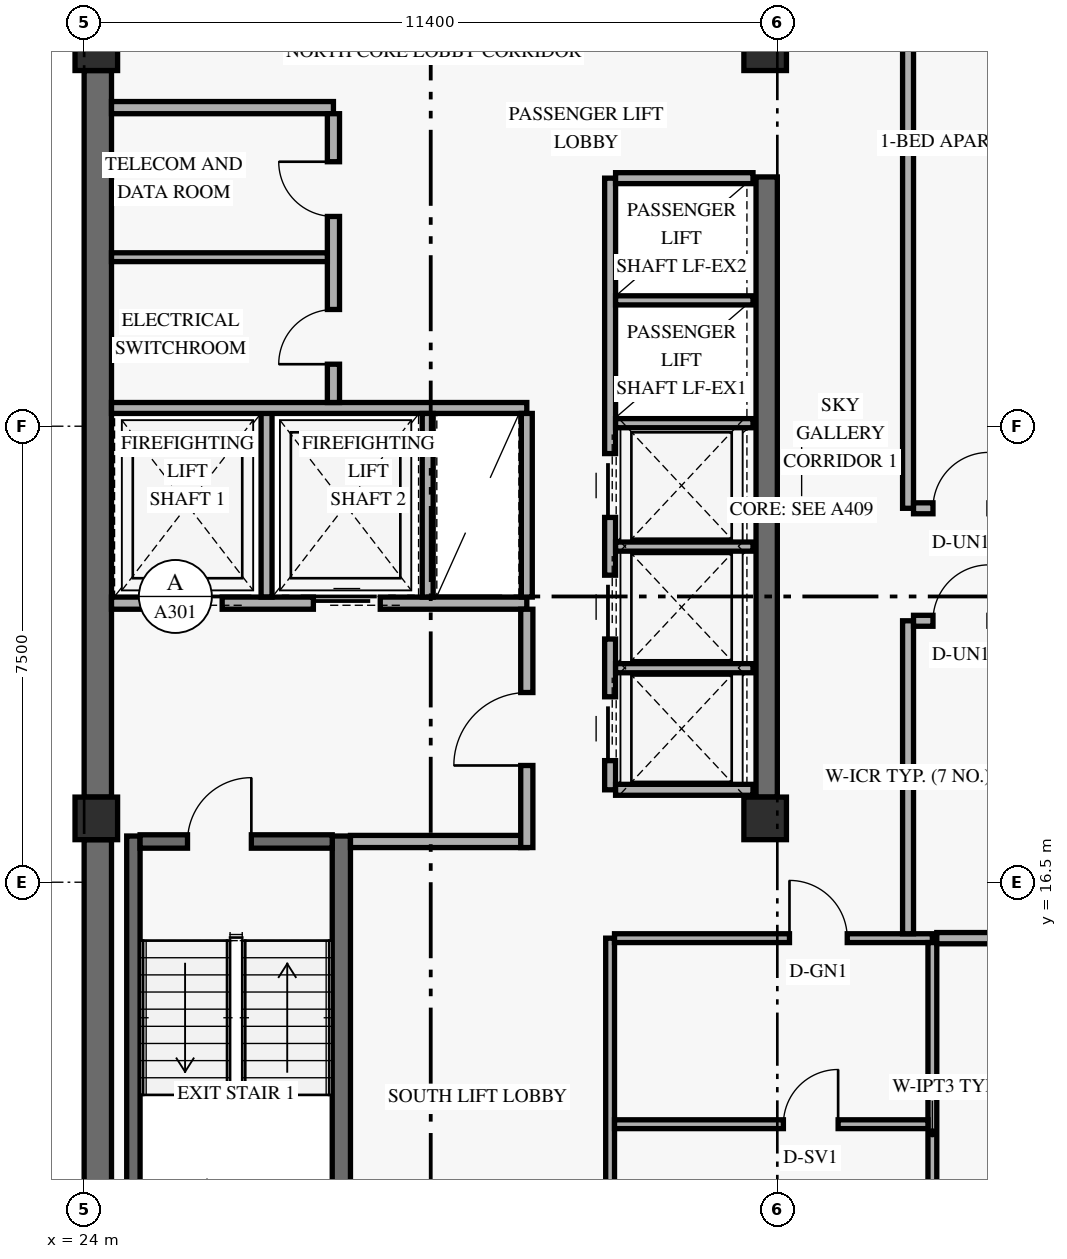
"""IFC4 building model, lengths in metres.
Left out: names, types, materials, properties, quantities, classifications, styles, units other than length and angle.
Written with IfcOpenShell. Run it as: python <this file> out.ifc"""

import sys

from ifc_helpers import new_model, si_unit, direction, frame, frame_2d, origin, origin_2d, place, context, subcontext, project, spatial, rectangle, extrude, element, fill, save


model = new_model("IFC4")
c1 = context("Model", 3, precision=1e-05, world=origin(), true_north=direction((0.0, 1.0)))
c2 = subcontext(c1, "Body", "Model", "MODEL_VIEW")
j1 = project(units=[si_unit("LENGTHUNIT", "METRE"), si_unit("PLANEANGLEUNIT", "RADIAN")], contexts=[c1])
p1 = place(None, origin())
s1 = spatial("IfcSite", under=j1, at=p1, CompositionType="ELEMENT")
p2 = place(p1, origin())
s2 = spatial("IfcBuilding", under=s1, at=p2, CompositionType="ELEMENT")
p3 = place(p2, frame((0.0, 0.0, 253.2)))
s3 = spatial("IfcBuildingStorey", under=s2, at=p3, CompositionType="ELEMENT", Elevation=253.2)
p4 = place(p3, frame((24.225, 9.6, 0.0), z_axis=(0.0, 0.0, 1.0), x_axis=(0.0, 1.0, 0.0)))
e1 = element("IfcWall", 1, at=p4, inside=s3, PredefinedType="SHEAR", context=c2, shape_type="SweptSolid", body=[
    extrude(rectangle(XDim=7.6, YDim=0.45, at=frame_2d((3.8, 0.0))), origin(), (0.0, 0.0, 1.0), 2.821),
])
p5 = place(p3, frame((24.225, 17.9, 0.0), z_axis=(0.0, 0.0, 1.0), x_axis=(0.0, 1.0, 0.0)))
e2 = element("IfcWall", 2, at=p5, inside=s3, PredefinedType="SHEAR", context=c2, shape_type="SweptSolid", body=[
    extrude(rectangle(XDim=11.95, YDim=0.45, at=frame_2d((5.975, 0.0))), origin(), (0.0, 0.0, 1.0), 2.821),
])
p6 = place(p3, frame((35.225, 17.9, 0.0), z_axis=(0.0, 0.0, 1.0), x_axis=(0.0, 1.0, 0.0)))
e3 = element("IfcWall", 3, at=p6, inside=s3, PredefinedType="SHEAR", context=c2, shape_type="SweptSolid", body=[
    extrude(rectangle(XDim=10.2, YDim=0.35, at=frame_2d((5.1, 0.0))), origin(), (0.0, 0.0, 1.0), 2.821),
])
p7 = place(p3, frame((24.81, 9.5, 0.0), z_axis=(0.0, 0.0, 1.0), x_axis=(0.0, 1.0, 0.0)))
e4 = element("IfcWall", 4, at=p7, inside=s3, PredefinedType="SHEAR", context=c2, shape_type="SweptSolid", body=[
    extrude(rectangle(XDim=7.76, YDim=0.22, at=frame_2d((3.88, 0.0))), origin(), (0.0, 0.0, 1.0), 3.36),
])
p8 = place(p3, frame((28.23, 9.5, 0.0), z_axis=(0.0, 0.0, 1.0), x_axis=(0.0, 1.0, 0.0)))
e5 = element("IfcWall", 5, at=p8, inside=s3, PredefinedType="SHEAR", context=c2, shape_type="SweptSolid", body=[
    extrude(rectangle(XDim=7.76, YDim=0.3, at=frame_2d((3.88, 0.0))), origin(), (0.0, 0.0, 1.0), 3.36),
])
p9 = place(p3, frame((24.92, 17.17, 0.0), z_axis=(0.0, 0.0, 1.0), x_axis=(1.0, 0.0, 0.0)))
e6 = element("IfcWall", 6, at=p9, inside=s3, PredefinedType="SHEAR", context=c2, shape_type="SweptSolid", body=[
    extrude(rectangle(XDim=3.16, YDim=0.22, at=frame_2d((1.58, 0.0))), origin(), (0.0, 0.0, 1.0), 3.36),
])
p10 = place(p9, frame((0.78, 0.0, 0.0)))
e7 = element("IfcOpeningElement", 7, at=p10, cuts=e6, PredefinedType="OPENING", context=c2, shape_type="SweptSolid", body=[
    extrude(rectangle(XDim=1.05, YDim=2.15, at=frame_2d((0.525, 1.075))), frame((0.0, 0.12, 0.0), z_axis=(0.0, -1.0, 0.0), x_axis=(1.0, 0.0, 0.0)), (0.0, 0.0, 1.0), 0.24),
])
for number, where, z_axis, x_axis in (
    (8, (24.2, 17.55, 0.0), (0.0, 0.0, 1.0), (1.0, 0.0, 0.0)),
    (9, (24.2, 30.2, 0.0), (0.0, 0.0, 1.0), (1.0, 0.0, 0.0)),
    (10, (35.2, 17.55, 0.0), (0.0, 0.0, 1.0), (1.0, 0.0, 0.0)),
    (11, (35.2, 30.2, 0.0), (0.0, 0.0, 1.0), (1.0, 0.0, 0.0)),
):
    element("IfcColumn", number, at=place(p3, frame(where, z_axis=z_axis, x_axis=x_axis)), inside=s3, PredefinedType="COLUMN", context=c2, shape_type="SweptSolid", body=[
        extrude(rectangle(XDim=0.7, YDim=0.7, at=origin_2d()), origin(), (0.0, 0.0, 1.0), 3.6),
    ])
p11 = place(p3, frame((24.45, 21.09, 0.0), z_axis=(0.0, 0.0, 1.0), x_axis=(1.0, 0.0, 0.0)))
e12 = element("IfcWall", 12, at=p11, inside=s3, PredefinedType="STANDARD", context=c2, shape_type="SweptSolid", body=[
    extrude(rectangle(XDim=6.83, YDim=0.2, at=frame_2d((3.415, 0.0))), origin(), (0.0, 0.0, 1.0), 3.36),
])
p12 = place(p11, frame((0.72, 0.0, 0.0)))
e13 = element("IfcOpeningElement", 13, at=p12, cuts=e12, PredefinedType="OPENING", context=c2, shape_type="SweptSolid", body=[
    extrude(rectangle(XDim=1.1, YDim=2.2, at=frame_2d((0.55, 1.1))), frame((0.0, 0.11, 0.0), z_axis=(0.0, -1.0, 0.0), x_axis=(1.0, 0.0, 0.0)), (0.0, 0.0, 1.0), 0.22),
])
p13 = place(p11, frame((3.32, 0.0, 0.0)))
e14 = element("IfcOpeningElement", 14, at=p13, cuts=e12, PredefinedType="OPENING", context=c2, shape_type="SweptSolid", body=[
    extrude(rectangle(XDim=1.1, YDim=2.2, at=frame_2d((0.55, 1.1))), frame((0.0, 0.11, 0.0), z_axis=(0.0, -1.0, 0.0), x_axis=(1.0, 0.0, 0.0)), (0.0, 0.0, 1.0), 0.22),
])
p14 = place(p3, frame((28.38, 17.17, 0.0), z_axis=(0.0, 0.0, 1.0), x_axis=(1.0, 0.0, 0.0)))
e15 = element("IfcWall", 15, at=p14, inside=s3, PredefinedType="STANDARD", context=c2, shape_type="SweptSolid", body=[
    extrude(rectangle(XDim=2.9, YDim=0.2, at=frame_2d((1.45, 0.0))), origin(), (0.0, 0.0, 1.0), 3.36),
])
p15 = place(p3, frame((31.28, 17.07, 0.0), z_axis=(0.0, 0.0, 1.0), x_axis=(0.0, 1.0, 0.0)))
e16 = element("IfcWall", 16, at=p15, inside=s3, PredefinedType="STANDARD", context=c2, shape_type="SweptSolid", body=[
    extrude(rectangle(XDim=3.92, YDim=0.2, at=frame_2d((1.96, 0.0))), origin(), (0.0, 0.0, 1.0), 2.803),
])
p16 = place(p15, frame((1.35, 0.0, 0.0)))
e17 = element("IfcOpeningElement", 17, at=p16, cuts=e16, PredefinedType="OPENING", context=c2, shape_type="SweptSolid", body=[
    extrude(rectangle(XDim=1.2, YDim=2.15, at=frame_2d((0.6, 1.075))), frame((0.0, 0.11, 0.0), z_axis=(0.0, -1.0, 0.0), x_axis=(1.0, 0.0, 0.0)), (0.0, 0.0, 1.0), 0.22),
])
p17 = place(p3, frame((27.0, 21.19, 0.0), z_axis=(0.0, 0.0, 1.0), x_axis=(0.0, 1.0, 0.0)))
e18 = element("IfcWall", 18, at=p17, inside=s3, PredefinedType="STANDARD", context=c2, shape_type="SweptSolid", body=[
    extrude(rectangle(XDim=3.11, YDim=0.18, at=frame_2d((1.555, 0.0))), origin(), (0.0, 0.0, 1.0), 3.36),
])
p18 = place(p3, frame((24.45, 24.3, 0.0), z_axis=(0.0, 0.0, 1.0), x_axis=(1.0, 0.0, 0.0)))
e19 = element("IfcWall", 19, at=p18, inside=s3, PredefinedType="STANDARD", context=c2, shape_type="SweptSolid", body=[
    extrude(rectangle(XDim=6.83, YDim=0.18, at=frame_2d((3.415, 0.0))), origin(), (0.0, 0.0, 1.0), 3.36),
])
for number, where, z_axis, x_axis in (
    (20, (29.65, 21.19, 0.0), (0.0, 0.0, 1.0), (0.0, 1.0, 0.0)),
    (21, (31.28, 21.19, 0.0), (0.0, 0.0, 1.0), (0.0, 1.0, 0.0)),
):
    element("IfcWall", number, at=place(p3, frame(where, z_axis=z_axis, x_axis=x_axis)), inside=s3, PredefinedType="STANDARD", context=c2, shape_type="SweptSolid", body=[
        extrude(rectangle(XDim=3.02, YDim=0.18, at=frame_2d((1.51, 0.0))), origin(), (0.0, 0.0, 1.0), 3.36),
    ])
p19 = place(p3, frame((24.45, 29.24, 0.0), z_axis=(0.0, 0.0, 1.0), x_axis=(1.0, 0.0, 0.0)))
e22 = element("IfcWall", 22, at=p19, inside=s3, PredefinedType="STANDARD", context=c2, shape_type="SweptSolid", body=[
    extrude(rectangle(XDim=3.65, YDim=0.2, at=frame_2d((1.825, 0.0))), origin(), (0.0, 0.0, 1.0), 3.36),
])
p20 = place(p3, frame((28.1, 24.39, 0.0), z_axis=(0.0, 0.0, 1.0), x_axis=(0.0, 1.0, 0.0)))
e23 = element("IfcWall", 23, at=p20, inside=s3, PredefinedType="STANDARD", context=c2, shape_type="SweptSolid", body=[
    extrude(rectangle(XDim=4.75, YDim=0.2, at=frame_2d((2.375, 0.0))), origin(), (0.0, 0.0, 1.0), 3.36),
])
p21 = place(p20, frame((0.63, 0.0, 0.0)))
e24 = element("IfcOpeningElement", 24, at=p21, cuts=e23, PredefinedType="OPENING", context=c2, shape_type="SweptSolid", body=[
    extrude(rectangle(XDim=0.9, YDim=2.1, at=frame_2d((0.45, 1.05))), frame((0.0, 0.11, 0.0), z_axis=(0.0, -1.0, 0.0), x_axis=(1.0, 0.0, 0.0)), (0.0, 0.0, 1.0), 0.22),
])
p22 = place(p20, frame((3.06, 0.0, 0.0)))
e25 = element("IfcOpeningElement", 25, at=p22, cuts=e23, PredefinedType="OPENING", context=c2, shape_type="SweptSolid", body=[
    extrude(rectangle(XDim=0.9, YDim=2.1, at=frame_2d((0.45, 1.05))), frame((0.0, 0.11, 0.0), z_axis=(0.0, -1.0, 0.0), x_axis=(1.0, 0.0, 0.0)), (0.0, 0.0, 1.0), 0.22),
])
p23 = place(p3, frame((24.45, 26.78, 0.0), z_axis=(0.0, 0.0, 1.0), x_axis=(1.0, 0.0, 0.0)))
e26 = element("IfcWall", 26, at=p23, inside=s3, PredefinedType="PARTITIONING", context=c2, shape_type="SweptSolid", body=[
    extrude(rectangle(XDim=3.55, YDim=0.145, at=frame_2d((1.775, 0.0))), origin(), (0.0, 0.0, 1.0), 3.36),
])
p24 = place(p3, frame((32.65, 18.02, 0.0), z_axis=(0.0, 0.0, 1.0), x_axis=(0.0, 1.0, 0.0)))
e27 = element("IfcWall", 27, at=p24, inside=s3, PredefinedType="STANDARD", context=c2, shape_type="SweptSolid", body=[
    extrude(rectangle(XDim=10.06, YDim=0.18, at=frame_2d((5.03, 0.0))), origin(), (0.0, 0.0, 1.0), 3.36),
])
p25 = place(p24, frame((0.48, 0.0, 0.0)))
e28 = element("IfcOpeningElement", 28, at=p25, cuts=e27, PredefinedType="OPENING", context=c2, shape_type="SweptSolid", body=[
    extrude(rectangle(XDim=1.05, YDim=2.2, at=frame_2d((0.525, 1.1))), frame((0.0, 0.1, 0.0), z_axis=(0.0, -1.0, 0.0), x_axis=(1.0, 0.0, 0.0)), (0.0, 0.0, 1.0), 0.2),
])
p26 = place(p24, frame((2.48, 0.0, 0.0)))
e29 = element("IfcOpeningElement", 29, at=p26, cuts=e27, PredefinedType="OPENING", context=c2, shape_type="SweptSolid", body=[
    extrude(rectangle(XDim=1.05, YDim=2.2, at=frame_2d((0.525, 1.1))), frame((0.0, 0.1, 0.0), z_axis=(0.0, -1.0, 0.0), x_axis=(1.0, 0.0, 0.0)), (0.0, 0.0, 1.0), 0.2),
])
p27 = place(p24, frame((4.48, 0.0, 0.0)))
e30 = element("IfcOpeningElement", 30, at=p27, cuts=e27, PredefinedType="OPENING", context=c2, shape_type="SweptSolid", body=[
    extrude(rectangle(XDim=1.05, YDim=2.2, at=frame_2d((0.525, 1.1))), frame((0.0, 0.1, 0.0), z_axis=(0.0, -1.0, 0.0), x_axis=(1.0, 0.0, 0.0)), (0.0, 0.0, 1.0), 0.2),
])
for number, where, z_axis, x_axis in (
    (31, (32.74, 18.02, 0.0), (0.0, 0.0, 1.0), (1.0, 0.0, 0.0)),
    (32, (32.74, 28.08, 0.0), (0.0, 0.0, 1.0), (1.0, 0.0, 0.0)),
):
    element("IfcWall", number, at=place(p3, frame(where, z_axis=z_axis, x_axis=x_axis)), inside=s3, PredefinedType="STANDARD", context=c2, shape_type="SweptSolid", body=[
        extrude(rectangle(XDim=2.26, YDim=0.18, at=frame_2d((1.13, 0.0))), origin(), (0.0, 0.0, 1.0), 3.36),
    ])
for number, where, z_axis, x_axis in (
    (33, (32.74, 20.02, 0.0), (0.0, 0.0, 1.0), (1.0, 0.0, 0.0)),
    (34, (32.74, 22.02, 0.0), (0.0, 0.0, 1.0), (1.0, 0.0, 0.0)),
    (35, (32.74, 24.05, 0.0), (0.0, 0.0, 1.0), (1.0, 0.0, 0.0)),
    (36, (32.74, 26.07, 0.0), (0.0, 0.0, 1.0), (1.0, 0.0, 0.0)),
):
    element("IfcWall", number, at=place(p3, frame(where, z_axis=z_axis, x_axis=x_axis)), inside=s3, PredefinedType="STANDARD", context=c2, shape_type="SweptSolid", body=[
        extrude(rectangle(XDim=2.26, YDim=0.15, at=frame_2d((1.13, 0.0))), origin(), (0.0, 0.0, 1.0), 3.36),
    ])
p28 = place(p3, frame((32.65, 9.5, 0.0), z_axis=(0.0, 0.0, 1.0), x_axis=(0.0, 1.0, 0.0)))
e37 = element("IfcWall", 37, at=p28, inside=s3, PredefinedType="PARTITIONING", context=c2, shape_type="SweptSolid", body=[
    extrude(rectangle(XDim=6.08, YDim=0.145, at=frame_2d((3.04, 0.0))), origin(), (0.0, 0.0, 1.0), 3.36),
])
p29 = place(p3, frame((32.722, 15.58, 0.0), z_axis=(0.0, 0.0, 1.0), x_axis=(1.0, 0.0, 0.0)))
e38 = element("IfcWall", 38, at=p29, inside=s3, PredefinedType="PARTITIONING", context=c2, shape_type="SweptSolid", body=[
    extrude(rectangle(XDim=5.228, YDim=0.145, at=frame_2d((2.614, 0.0))), origin(), (0.0, 0.0, 1.0), 2.803),
])
p30 = place(p29, frame((2.877, 0.0, 0.0)))
e39 = element("IfcOpeningElement", 39, at=p30, cuts=e38, PredefinedType="OPENING", context=c2, shape_type="SweptSolid", body=[
    extrude(rectangle(XDim=0.95, YDim=2.15, at=frame_2d((0.475, 1.075))), frame((0.0, 0.083, 0.0), z_axis=(0.0, -1.0, 0.0), x_axis=(1.0, 0.0, 0.0)), (0.0, 0.0, 1.0), 0.165),
])
p31 = place(p3, frame((37.95, 9.25, 0.0), z_axis=(0.0, 0.0, 1.0), x_axis=(0.0, 1.0, 0.0)))
e40 = element("IfcWall", 40, at=p31, inside=s3, PredefinedType="PARTITIONING", context=c2, shape_type="SweptSolid", body=[
    extrude(rectangle(XDim=6.258, YDim=0.145, at=frame_2d((3.129, 0.0))), origin(), (0.0, 0.0, 1.0), 2.803),
])
p32 = place(p3, frame((32.722, 12.52, 0.0), z_axis=(0.0, 0.0, 1.0), x_axis=(1.0, 0.0, 0.0)))
e41 = element("IfcWall", 41, at=p32, inside=s3, PredefinedType="PARTITIONING", context=c2, shape_type="SweptSolid", body=[
    extrude(rectangle(XDim=5.155, YDim=0.145, at=frame_2d((2.578, 0.0))), origin(), (0.0, 0.0, 1.0), 2.803),
])
p33 = place(p32, frame((2.778, 0.0, 0.0)))
e42 = element("IfcOpeningElement", 42, at=p33, cuts=e41, PredefinedType="OPENING", context=c2, shape_type="SweptSolid", body=[
    extrude(rectangle(XDim=0.9, YDim=2.1, at=frame_2d((0.45, 1.05))), frame((0.0, 0.083, 0.0), z_axis=(0.0, -1.0, 0.0), x_axis=(1.0, 0.0, 0.0)), (0.0, 0.0, 1.0), 0.165),
])
p34 = place(p3, frame((37.55, 15.653, 0.0), z_axis=(0.0, 0.0, 1.0), x_axis=(0.0, 1.0, 0.0)))
e43 = element("IfcWall", 43, at=p34, inside=s3, PredefinedType="STANDARD", context=c2, shape_type="SweptSolid", body=[
    extrude(rectangle(XDim=5.147, YDim=0.18, at=frame_2d((2.574, 0.0))), origin(), (0.0, 0.0, 1.0), 2.803),
])
p35 = place(p3, frame((37.55, 22.65, 0.0), z_axis=(0.0, 0.0, 1.0), x_axis=(0.0, 1.0, 0.0)))
e44 = element("IfcWall", 44, at=p35, inside=s3, PredefinedType="STANDARD", context=c2, shape_type="SweptSolid", body=[
    extrude(rectangle(XDim=8.628, YDim=0.18, at=frame_2d((4.314, 0.0))), origin(), (0.0, 0.0, 1.0), 2.803),
])
p36 = place(p3, frame((37.64, 20.8, 0.0), z_axis=(0.0, 0.0, 1.0), x_axis=(1.0, 0.0, 0.0)))
e45 = element("IfcWall", 45, at=p36, inside=s3, PredefinedType="STANDARD", context=c2, shape_type="SweptSolid", body=[
    extrude(rectangle(XDim=12.17, YDim=0.18, at=frame_2d((6.085, 0.0))), origin(), (0.0, 0.0, 1.0), 2.803),
])
p37 = place(p36, frame((0.32, 0.0, 0.0)))
e46 = element("IfcOpeningElement", 46, at=p37, cuts=e45, PredefinedType="OPENING", context=c2, shape_type="SweptSolid", body=[
    extrude(rectangle(XDim=0.92, YDim=2.15, at=frame_2d((0.46, 1.075))), frame((0.0, 0.1, 0.0), z_axis=(0.0, -1.0, 0.0), x_axis=(1.0, 0.0, 0.0)), (0.0, 0.0, 1.0), 0.2),
])
p38 = place(p3, frame((37.64, 22.65, 0.0), z_axis=(0.0, 0.0, 1.0), x_axis=(1.0, 0.0, 0.0)))
e47 = element("IfcWall", 47, at=p38, inside=s3, PredefinedType="STANDARD", context=c2, shape_type="SweptSolid", body=[
    extrude(rectangle(XDim=12.17, YDim=0.18, at=frame_2d((6.085, 0.0))), origin(), (0.0, 0.0, 1.0), 2.803),
])
p39 = place(p38, frame((0.32, 0.0, 0.0)))
e48 = element("IfcOpeningElement", 48, at=p39, cuts=e47, PredefinedType="OPENING", context=c2, shape_type="SweptSolid", body=[
    extrude(rectangle(XDim=0.92, YDim=2.15, at=frame_2d((0.46, 1.075))), frame((0.0, 0.1, 0.0), z_axis=(0.0, -1.0, 0.0), x_axis=(1.0, 0.0, 0.0)), (0.0, 0.0, 1.0), 0.2),
])
p40 = place(p3, frame((38.022, 15.58, 0.0), z_axis=(0.0, 0.0, 1.0), x_axis=(1.0, 0.0, 0.0)))
e49 = element("IfcWall", 49, at=p40, inside=s3, PredefinedType="PARTITIONING", context=c2, shape_type="SweptSolid", body=[
    extrude(rectangle(XDim=11.788, YDim=0.185, at=frame_2d((5.894, 0.0))), origin(), (0.0, 0.0, 1.0), 2.803),
])
p41 = place(p10, frame((1.05, 0.0, 0.0), z_axis=(0.0, 0.0, 1.0), x_axis=(-1.0, 0.0, 0.0)))
e50 = element("IfcDoor", 50, at=p41, inside=s3, OperationType="SINGLE_SWING_LEFT", PredefinedType="DOOR", context=c2, shape_type="SweptSolid", body=[
    extrude(rectangle(XDim=1.05, YDim=2.15, at=frame_2d((0.525, 1.075))), frame((0.0, 0.025, 0.0), z_axis=(0.0, -1.0, 0.0), x_axis=(1.0, 0.0, 0.0)), (0.0, 0.0, 1.0), 0.05),
])
fill(e7, e50)
p42 = place(p12, origin())
e51 = element("IfcDoor", 51, at=p42, inside=s3, OperationType="SLIDING_TO_LEFT", PredefinedType="DOOR", context=c2, shape_type="SweptSolid", body=[
    extrude(rectangle(XDim=1.1, YDim=2.2, at=frame_2d((0.55, 1.1))), frame((0.0, 0.025, 0.0), z_axis=(0.0, -1.0, 0.0), x_axis=(1.0, 0.0, 0.0)), (0.0, 0.0, 1.0), 0.05),
])
fill(e13, e51)
p43 = place(p13, origin())
e52 = element("IfcDoor", 52, at=p43, inside=s3, OperationType="SLIDING_TO_LEFT", PredefinedType="DOOR", context=c2, shape_type="SweptSolid", body=[
    extrude(rectangle(XDim=1.1, YDim=2.2, at=frame_2d((0.55, 1.1))), frame((0.0, 0.025, 0.0), z_axis=(0.0, -1.0, 0.0), x_axis=(1.0, 0.0, 0.0)), (0.0, 0.0, 1.0), 0.05),
])
fill(e14, e52)
p44 = place(p16, origin())
e53 = element("IfcDoor", 53, at=p44, inside=s3, OperationType="SINGLE_SWING_LEFT", PredefinedType="DOOR", context=c2, shape_type="SweptSolid", body=[
    extrude(rectangle(XDim=1.2, YDim=2.15, at=frame_2d((0.6, 1.075))), frame((0.0, 0.025, 0.0), z_axis=(0.0, -1.0, 0.0), x_axis=(1.0, 0.0, 0.0)), (0.0, 0.0, 1.0), 0.05),
])
fill(e17, e53)
p45 = place(p21, origin())
e54 = element("IfcDoor", 54, at=p45, inside=s3, OperationType="SINGLE_SWING_LEFT", PredefinedType="DOOR", context=c2, shape_type="SweptSolid", body=[
    extrude(rectangle(XDim=0.9, YDim=2.1, at=frame_2d((0.45, 1.05))), frame((0.0, 0.025, 0.0), z_axis=(0.0, -1.0, 0.0), x_axis=(1.0, 0.0, 0.0)), (0.0, 0.0, 1.0), 0.05),
])
fill(e24, e54)
p46 = place(p22, origin())
e55 = element("IfcDoor", 55, at=p46, inside=s3, OperationType="SINGLE_SWING_RIGHT", PredefinedType="DOOR", context=c2, shape_type="SweptSolid", body=[
    extrude(rectangle(XDim=0.9, YDim=2.1, at=frame_2d((0.45, 1.05))), frame((0.0, 0.025, 0.0), z_axis=(0.0, -1.0, 0.0), x_axis=(1.0, 0.0, 0.0)), (0.0, 0.0, 1.0), 0.05),
])
fill(e25, e55)
p47 = place(p25, origin())
e56 = element("IfcDoor", 56, at=p47, inside=s3, OperationType="SLIDING_TO_LEFT", PredefinedType="DOOR", context=c2, shape_type="SweptSolid", body=[
    extrude(rectangle(XDim=1.05, YDim=2.2, at=frame_2d((0.525, 1.1))), frame((0.0, 0.025, 0.0), z_axis=(0.0, -1.0, 0.0), x_axis=(1.0, 0.0, 0.0)), (0.0, 0.0, 1.0), 0.05),
])
fill(e28, e56)
p48 = place(p26, origin())
e57 = element("IfcDoor", 57, at=p48, inside=s3, OperationType="SLIDING_TO_LEFT", PredefinedType="DOOR", context=c2, shape_type="SweptSolid", body=[
    extrude(rectangle(XDim=1.05, YDim=2.2, at=frame_2d((0.525, 1.1))), frame((0.0, 0.025, 0.0), z_axis=(0.0, -1.0, 0.0), x_axis=(1.0, 0.0, 0.0)), (0.0, 0.0, 1.0), 0.05),
])
fill(e29, e57)
p49 = place(p27, origin())
e58 = element("IfcDoor", 58, at=p49, inside=s3, OperationType="SLIDING_TO_LEFT", PredefinedType="DOOR", context=c2, shape_type="SweptSolid", body=[
    extrude(rectangle(XDim=1.05, YDim=2.2, at=frame_2d((0.525, 1.1))), frame((0.0, 0.025, 0.0), z_axis=(0.0, -1.0, 0.0), x_axis=(1.0, 0.0, 0.0)), (0.0, 0.0, 1.0), 0.05),
])
fill(e30, e58)
p50 = place(p30, origin())
e59 = element("IfcDoor", 59, at=p50, inside=s3, OperationType="SINGLE_SWING_LEFT", PredefinedType="DOOR", context=c2, shape_type="SweptSolid", body=[
    extrude(rectangle(XDim=0.95, YDim=2.15, at=frame_2d((0.475, 1.075))), frame((0.0, 0.025, 0.0), z_axis=(0.0, -1.0, 0.0), x_axis=(1.0, 0.0, 0.0)), (0.0, 0.0, 1.0), 0.05),
])
fill(e39, e59)
p51 = place(p33, origin())
e60 = element("IfcDoor", 60, at=p51, inside=s3, OperationType="SINGLE_SWING_RIGHT", PredefinedType="DOOR", context=c2, shape_type="SweptSolid", body=[
    extrude(rectangle(XDim=0.9, YDim=2.1, at=frame_2d((0.45, 1.05))), frame((0.0, 0.025, 0.0), z_axis=(0.0, -1.0, 0.0), x_axis=(1.0, 0.0, 0.0)), (0.0, 0.0, 1.0), 0.05),
])
fill(e42, e60)
p52 = place(p37, origin())
e61 = element("IfcDoor", 61, at=p52, inside=s3, OperationType="SINGLE_SWING_RIGHT", PredefinedType="DOOR", context=c2, shape_type="SweptSolid", body=[
    extrude(rectangle(XDim=0.92, YDim=2.15, at=frame_2d((0.46, 1.075))), frame((0.0, 0.025, 0.0), z_axis=(0.0, -1.0, 0.0), x_axis=(1.0, 0.0, 0.0)), (0.0, 0.0, 1.0), 0.05),
])
fill(e46, e61)
p53 = place(p39, origin())
e62 = element("IfcDoor", 62, at=p53, inside=s3, OperationType="SINGLE_SWING_RIGHT", PredefinedType="DOOR", context=c2, shape_type="SweptSolid", body=[
    extrude(rectangle(XDim=0.92, YDim=2.15, at=frame_2d((0.46, 1.075))), frame((0.0, 0.025, 0.0), z_axis=(0.0, -1.0, 0.0), x_axis=(1.0, 0.0, 0.0)), (0.0, 0.0, 1.0), 0.05),
])
fill(e48, e62)
save(model, sys.argv[1])
